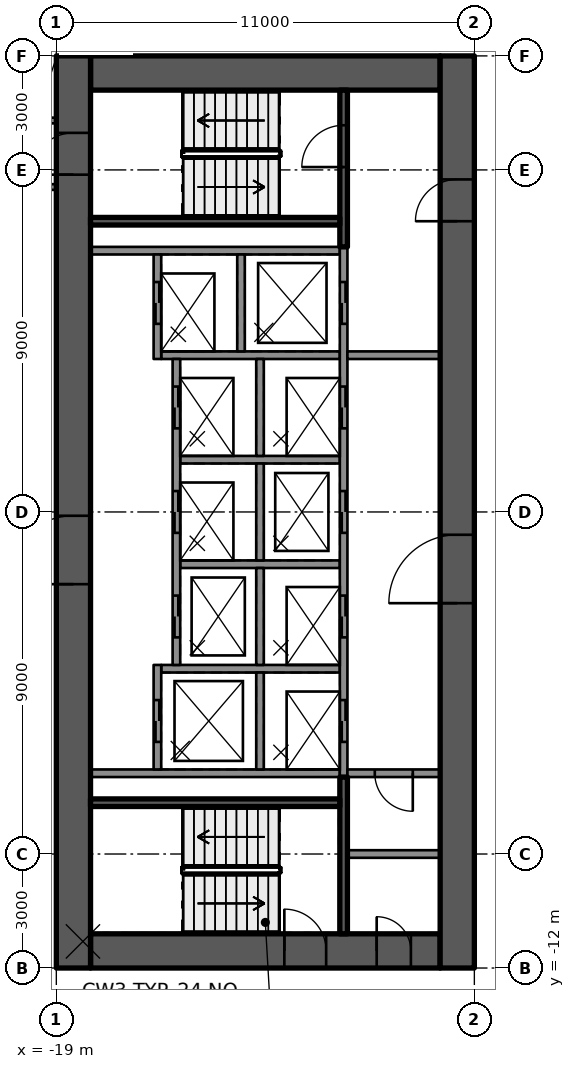
"""IFC4 building model, lengths in metres.
Left out: names, types, materials, properties, quantities, classifications, styles, units other than length and angle.
Written with IfcOpenShell. Run it as: python <this file> out.ifc"""

import sys

from ifc_helpers import new_model, si_unit, direction, frame, frame_2d, origin, place, context, subcontext, project, spatial, rectangle, extrude, element, fill, save


model = new_model("IFC4")
c1 = context("Model", 3, precision=1e-05, world=origin(), true_north=direction((0.0, 1.0)))
c2 = subcontext(c1, "Body", "Model", "MODEL_VIEW")
j1 = project(units=[si_unit("LENGTHUNIT", "METRE"), si_unit("PLANEANGLEUNIT", "RADIAN")], contexts=[c1])
p1 = place(None, origin())
s1 = spatial("IfcSite", under=j1, at=p1, CompositionType="ELEMENT")
p2 = place(p1, origin())
s2 = spatial("IfcBuilding", under=s1, at=p2, CompositionType="ELEMENT")
p3 = place(p2, origin())
s3 = spatial("IfcBuildingStorey", under=s2, at=p3, CompositionType="ELEMENT", Elevation=0.0)
p4 = place(p3, frame((-18.1, 11.55, -0.5), z_axis=(0.0, 0.0, 1.0), x_axis=(1.0, 0.0, 0.0)))
e1 = element("IfcWall", 1, at=p4, inside=s3, PredefinedType="SHEAR", context=c2, shape_type="SweptSolid", body=[
    extrude(rectangle(XDim=9.2, YDim=0.9, at=frame_2d((4.6, 0.0))), origin(), (0.0, 0.0, 1.0), 11.0),
])
p5 = place(p3, frame((-18.1, -11.55, -0.5), z_axis=(0.0, 0.0, 1.0), x_axis=(1.0, 0.0, 0.0)))
e2 = element("IfcWall", 2, at=p5, inside=s3, PredefinedType="SHEAR", context=c2, shape_type="SweptSolid", body=[
    extrude(rectangle(XDim=9.2, YDim=0.9, at=frame_2d((4.6, 0.0))), origin(), (0.0, 0.0, 1.0), 11.0),
])
p6 = place(p5, frame((5.1, 0.0, 0.5)))
e3 = element("IfcOpeningElement", 3, at=p6, cuts=e2, PredefinedType="OPENING", context=c2, shape_type="SweptSolid", body=[
    extrude(rectangle(XDim=1.1, YDim=2.1, at=frame_2d((0.55, 1.05))), frame((0.0, 0.46, 0.0), z_axis=(0.0, -1.0, 0.0), x_axis=(1.0, 0.0, 0.0)), (0.0, 0.0, 1.0), 0.92),
])
p7 = place(p5, frame((7.53, 0.0, 0.5)))
e4 = element("IfcOpeningElement", 4, at=p7, cuts=e2, PredefinedType="OPENING", context=c2, shape_type="SweptSolid", body=[
    extrude(rectangle(XDim=0.9, YDim=2.1, at=frame_2d((0.45, 1.05))), frame((0.0, 0.46, 0.0), z_axis=(0.0, -1.0, 0.0), x_axis=(1.0, 0.0, 0.0)), (0.0, 0.0, 1.0), 0.92),
])
p8 = place(p3, frame((-18.55, -12.0, -0.5), z_axis=(0.0, 0.0, 1.0), x_axis=(0.0, 1.0, 0.0)))
e5 = element("IfcWall", 5, at=p8, inside=s3, PredefinedType="SHEAR", context=c2, shape_type="SweptSolid", body=[
    extrude(rectangle(XDim=24.0, YDim=0.9, at=frame_2d((12.0, 0.0))), origin(), (0.0, 0.0, 1.0), 11.0),
])
p9 = place(p8, frame((10.1, 0.0, 0.5)))
e6 = element("IfcOpeningElement", 6, at=p9, cuts=e5, PredefinedType="OPENING", context=c2, shape_type="SweptSolid", body=[
    extrude(rectangle(XDim=1.8, YDim=2.1, at=frame_2d((0.9, 1.05))), frame((0.0, 0.46, 0.0), z_axis=(0.0, -1.0, 0.0), x_axis=(1.0, 0.0, 0.0)), (0.0, 0.0, 1.0), 0.92),
])
p10 = place(p8, frame((20.875, 0.0, 0.5)))
e7 = element("IfcOpeningElement", 7, at=p10, cuts=e5, PredefinedType="OPENING", context=c2, shape_type="SweptSolid", body=[
    extrude(rectangle(XDim=1.1, YDim=2.1, at=frame_2d((0.55, 1.05))), frame((0.0, 0.46, 0.0), z_axis=(0.0, -1.0, 0.0), x_axis=(1.0, 0.0, 0.0)), (0.0, 0.0, 1.0), 0.92),
])
p11 = place(p3, frame((-8.45, -12.0, -0.5), z_axis=(0.0, 0.0, 1.0), x_axis=(0.0, 1.0, 0.0)))
e8 = element("IfcWall", 8, at=p11, inside=s3, PredefinedType="SHEAR", context=c2, shape_type="SweptSolid", body=[
    extrude(rectangle(XDim=24.0, YDim=0.9, at=frame_2d((12.0, 0.0))), origin(), (0.0, 0.0, 1.0), 11.0),
])
p12 = place(p11, frame((9.6, 0.0, 0.5)))
e9 = element("IfcOpeningElement", 9, at=p12, cuts=e8, PredefinedType="OPENING", context=c2, shape_type="SweptSolid", body=[
    extrude(rectangle(XDim=1.8, YDim=2.1, at=frame_2d((0.9, 1.05))), frame((0.0, 0.46, 0.0), z_axis=(0.0, -1.0, 0.0), x_axis=(1.0, 0.0, 0.0)), (0.0, 0.0, 1.0), 0.92),
])
p13 = place(p11, frame((19.65, 0.0, 0.5)))
e10 = element("IfcOpeningElement", 10, at=p13, cuts=e8, PredefinedType="OPENING", context=c2, shape_type="SweptSolid", body=[
    extrude(rectangle(XDim=1.1, YDim=2.1, at=frame_2d((0.55, 1.05))), frame((0.0, 0.46, 0.0), z_axis=(0.0, -1.0, 0.0), x_axis=(1.0, 0.0, 0.0)), (0.0, 0.0, 1.0), 0.92),
])
for number, where, z_axis, x_axis in (
    (11, (-11.54, 6.875, 0.0), (0.0, 0.0, 1.0), (-1.0, 0.0, 0.0)),
    (12, (-11.54, -6.875, 0.0), (0.0, 0.0, 1.0), (-1.0, 0.0, 0.0)),
):
    element("IfcWall", number, at=place(p3, frame(where, z_axis=z_axis, x_axis=x_axis)), inside=s3, PredefinedType="SOLIDWALL", context=c2, shape_type="SweptSolid", body=[
        extrude(rectangle(XDim=6.56, YDim=0.2, at=frame_2d((3.28, 0.0))), origin(), (0.0, 0.0, 1.0), 10.09),
    ])
p14 = place(p3, frame((-11.54, -4.125, 0.0), z_axis=(0.0, 0.0, 1.0), x_axis=(-1.0, 0.0, 0.0)))
e13 = element("IfcWall", 13, at=p14, inside=s3, PredefinedType="SOLIDWALL", context=c2, shape_type="SweptSolid", body=[
    extrude(rectangle(XDim=4.7, YDim=0.2, at=frame_2d((2.35, 0.0))), origin(), (0.0, 0.0, 1.0), 10.09),
])
for number, where, z_axis, x_axis in (
    (14, (-11.54, -1.375, 0.0), (0.0, 0.0, 1.0), (-1.0, 0.0, 0.0)),
    (15, (-11.54, 1.375, 0.0), (0.0, 0.0, 1.0), (-1.0, 0.0, 0.0)),
):
    element("IfcWall", number, at=place(p3, frame(where, z_axis=z_axis, x_axis=x_axis)), inside=s3, PredefinedType="SOLIDWALL", context=c2, shape_type="SweptSolid", body=[
        extrude(rectangle(XDim=4.2, YDim=0.2, at=frame_2d((2.1, 0.0))), origin(), (0.0, 0.0, 1.0), 10.09),
    ])
p15 = place(p3, frame((-11.54, 4.125, 0.0), z_axis=(0.0, 0.0, 1.0), x_axis=(-1.0, 0.0, 0.0)))
e16 = element("IfcWall", 16, at=p15, inside=s3, PredefinedType="SOLIDWALL", context=c2, shape_type="SweptSolid", body=[
    extrude(rectangle(XDim=4.7, YDim=0.2, at=frame_2d((2.35, 0.0))), origin(), (0.0, 0.0, 1.0), 10.09),
])
p16 = place(p3, frame((-11.44, -6.975, 0.0), z_axis=(0.0, 0.0, 1.0), x_axis=(0.0, 1.0, 0.0)))
e17 = element("IfcWall", 17, at=p16, inside=s3, PredefinedType="SOLIDWALL", context=c2, shape_type="SweptSolid", body=[
    extrude(rectangle(XDim=13.95, YDim=0.2, at=frame_2d((6.975, 0.0))), origin(), (0.0, 0.0, 1.0), 10.09),
])
p17 = place(p16, frame((0.925, 0.0, 0.0)))
e18 = element("IfcOpeningElement", 18, at=p17, cuts=e17, PredefinedType="OPENING", context=c2, shape_type="SweptSolid", body=[
    extrude(rectangle(XDim=1.1, YDim=2.1, at=frame_2d((0.55, 1.05))), frame((0.0, 0.11, 0.0), z_axis=(0.0, -1.0, 0.0), x_axis=(1.0, 0.0, 0.0)), (0.0, 0.0, 1.0), 0.22),
])
p18 = place(p16, frame((3.675, 0.0, 0.0)))
e19 = element("IfcOpeningElement", 19, at=p18, cuts=e17, PredefinedType="OPENING", context=c2, shape_type="SweptSolid", body=[
    extrude(rectangle(XDim=1.1, YDim=2.1, at=frame_2d((0.55, 1.05))), frame((0.0, 0.11, 0.0), z_axis=(0.0, -1.0, 0.0), x_axis=(1.0, 0.0, 0.0)), (0.0, 0.0, 1.0), 0.22),
])
p19 = place(p16, frame((6.425, 0.0, 0.0)))
e20 = element("IfcOpeningElement", 20, at=p19, cuts=e17, PredefinedType="OPENING", context=c2, shape_type="SweptSolid", body=[
    extrude(rectangle(XDim=1.1, YDim=2.1, at=frame_2d((0.55, 1.05))), frame((0.0, 0.11, 0.0), z_axis=(0.0, -1.0, 0.0), x_axis=(1.0, 0.0, 0.0)), (0.0, 0.0, 1.0), 0.22),
])
p20 = place(p16, frame((9.175, 0.0, 0.0)))
e21 = element("IfcOpeningElement", 21, at=p20, cuts=e17, PredefinedType="OPENING", context=c2, shape_type="SweptSolid", body=[
    extrude(rectangle(XDim=1.1, YDim=2.1, at=frame_2d((0.55, 1.05))), frame((0.0, 0.11, 0.0), z_axis=(0.0, -1.0, 0.0), x_axis=(1.0, 0.0, 0.0)), (0.0, 0.0, 1.0), 0.22),
])
p21 = place(p16, frame((11.925, 0.0, 0.0)))
e22 = element("IfcOpeningElement", 22, at=p21, cuts=e17, PredefinedType="OPENING", context=c2, shape_type="SweptSolid", body=[
    extrude(rectangle(XDim=1.1, YDim=2.1, at=frame_2d((0.55, 1.05))), frame((0.0, 0.11, 0.0), z_axis=(0.0, -1.0, 0.0), x_axis=(1.0, 0.0, 0.0)), (0.0, 0.0, 1.0), 0.22),
])
for number, where, z_axis, x_axis in (
    (23, (-13.64, -6.775, 0.0), (0.0, 0.0, 1.0), (0.0, 1.0, 0.0)),
    (24, (-13.64, -4.025, 0.0), (0.0, 0.0, 1.0), (0.0, 1.0, 0.0)),
    (25, (-13.64, -1.275, 0.0), (0.0, 0.0, 1.0), (0.0, 1.0, 0.0)),
    (26, (-13.64, 1.475, 0.0), (0.0, 0.0, 1.0), (0.0, 1.0, 0.0)),
    (27, (-14.14, 4.225, 0.0), (0.0, 0.0, 1.0), (0.0, 1.0, 0.0)),
):
    element("IfcWall", number, at=place(p3, frame(where, z_axis=z_axis, x_axis=x_axis)), inside=s3, PredefinedType="SOLIDWALL", context=c2, shape_type="SweptSolid", body=[
        extrude(rectangle(XDim=2.55, YDim=0.2, at=frame_2d((1.275, 0.0))), origin(), (0.0, 0.0, 1.0), 10.09),
    ])
p22 = place(p3, frame((-16.34, -6.775, 0.0), z_axis=(0.0, 0.0, 1.0), x_axis=(0.0, 1.0, 0.0)))
e28 = element("IfcWall", 28, at=p22, inside=s3, PredefinedType="SOLIDWALL", context=c2, shape_type="SweptSolid", body=[
    extrude(rectangle(XDim=2.75, YDim=0.2, at=frame_2d((1.375, 0.0))), origin(), (0.0, 0.0, 1.0), 10.09),
])
p23 = place(p22, frame((0.725, 0.0, 0.0)))
e29 = element("IfcOpeningElement", 29, at=p23, cuts=e28, PredefinedType="OPENING", context=c2, shape_type="SweptSolid", body=[
    extrude(rectangle(XDim=1.1, YDim=2.1, at=frame_2d((0.55, 1.05))), frame((0.0, 0.11, 0.0), z_axis=(0.0, -1.0, 0.0), x_axis=(1.0, 0.0, 0.0)), (0.0, 0.0, 1.0), 0.22),
])
p24 = place(p3, frame((-15.84, -4.025, 0.0), z_axis=(0.0, 0.0, 1.0), x_axis=(0.0, 1.0, 0.0)))
e30 = element("IfcWall", 30, at=p24, inside=s3, PredefinedType="SOLIDWALL", context=c2, shape_type="SweptSolid", body=[
    extrude(rectangle(XDim=8.05, YDim=0.2, at=frame_2d((4.025, 0.0))), origin(), (0.0, 0.0, 1.0), 10.09),
])
p25 = place(p24, frame((0.725, 0.0, 0.0)))
e31 = element("IfcOpeningElement", 31, at=p25, cuts=e30, PredefinedType="OPENING", context=c2, shape_type="SweptSolid", body=[
    extrude(rectangle(XDim=1.1, YDim=2.1, at=frame_2d((0.55, 1.05))), frame((0.0, 0.11, 0.0), z_axis=(0.0, -1.0, 0.0), x_axis=(1.0, 0.0, 0.0)), (0.0, 0.0, 1.0), 0.22),
])
p26 = place(p24, frame((3.475, 0.0, 0.0)))
e32 = element("IfcOpeningElement", 32, at=p26, cuts=e30, PredefinedType="OPENING", context=c2, shape_type="SweptSolid", body=[
    extrude(rectangle(XDim=1.1, YDim=2.1, at=frame_2d((0.55, 1.05))), frame((0.0, 0.11, 0.0), z_axis=(0.0, -1.0, 0.0), x_axis=(1.0, 0.0, 0.0)), (0.0, 0.0, 1.0), 0.22),
])
p27 = place(p24, frame((6.225, 0.0, 0.0)))
e33 = element("IfcOpeningElement", 33, at=p27, cuts=e30, PredefinedType="OPENING", context=c2, shape_type="SweptSolid", body=[
    extrude(rectangle(XDim=1.1, YDim=2.1, at=frame_2d((0.55, 1.05))), frame((0.0, 0.11, 0.0), z_axis=(0.0, -1.0, 0.0), x_axis=(1.0, 0.0, 0.0)), (0.0, 0.0, 1.0), 0.22),
])
p28 = place(p3, frame((-16.34, 4.025, 0.0), z_axis=(0.0, 0.0, 1.0), x_axis=(0.0, 1.0, 0.0)))
e34 = element("IfcWall", 34, at=p28, inside=s3, PredefinedType="SOLIDWALL", context=c2, shape_type="SweptSolid", body=[
    extrude(rectangle(XDim=2.75, YDim=0.2, at=frame_2d((1.375, 0.0))), origin(), (0.0, 0.0, 1.0), 10.09),
])
p29 = place(p28, frame((0.925, 0.0, 0.0)))
e35 = element("IfcOpeningElement", 35, at=p29, cuts=e34, PredefinedType="OPENING", context=c2, shape_type="SweptSolid", body=[
    extrude(rectangle(XDim=1.1, YDim=2.1, at=frame_2d((0.55, 1.05))), frame((0.0, 0.11, 0.0), z_axis=(0.0, -1.0, 0.0), x_axis=(1.0, 0.0, 0.0)), (0.0, 0.0, 1.0), 0.22),
])
p30 = place(p3, frame((-11.44, 6.975, 0.0), z_axis=(0.0, 0.0, 1.0), x_axis=(0.0, 1.0, 0.0)))
e36 = element("IfcWall", 36, at=p30, inside=s3, PredefinedType="SOLIDWALL", context=c2, shape_type="SweptSolid", body=[
    extrude(rectangle(XDim=4.125, YDim=0.2, at=frame_2d((2.062, 0.0))), origin(), (0.0, 0.0, 1.0), 10.09),
])
p31 = place(p30, frame((2.1, 0.0, 0.0)))
e37 = element("IfcOpeningElement", 37, at=p31, cuts=e36, PredefinedType="OPENING", context=c2, shape_type="SweptSolid", body=[
    extrude(rectangle(XDim=1.1, YDim=2.1, at=frame_2d((0.55, 1.05))), frame((0.0, 0.11, 0.0), z_axis=(0.0, -1.0, 0.0), x_axis=(1.0, 0.0, 0.0)), (0.0, 0.0, 1.0), 0.22),
])
p32 = place(p3, frame((-11.54, 7.65, 0.0), z_axis=(0.0, 0.0, 1.0), x_axis=(-1.0, 0.0, 0.0)))
e38 = element("IfcWall", 38, at=p32, inside=s3, PredefinedType="SOLIDWALL", context=c2, shape_type="SweptSolid", body=[
    extrude(rectangle(XDim=6.56, YDim=0.2, at=frame_2d((3.28, 0.0))), origin(), (0.0, 0.0, 1.0), 10.09),
])
p33 = place(p3, frame((-11.44, -11.1, 0.0), z_axis=(0.0, 0.0, 1.0), x_axis=(0.0, 1.0, 0.0)))
e39 = element("IfcWall", 39, at=p33, inside=s3, PredefinedType="SOLIDWALL", context=c2, shape_type="SweptSolid", body=[
    extrude(rectangle(XDim=4.125, YDim=0.2, at=frame_2d((2.062, 0.0))), origin(), (0.0, 0.0, 1.0), 10.09),
])
p34 = place(p3, frame((-11.54, -7.65, 0.0), z_axis=(0.0, 0.0, 1.0), x_axis=(-1.0, 0.0, 0.0)))
e40 = element("IfcWall", 40, at=p34, inside=s3, PredefinedType="SOLIDWALL", context=c2, shape_type="SweptSolid", body=[
    extrude(rectangle(XDim=6.56, YDim=0.2, at=frame_2d((3.28, 0.0))), origin(), (0.0, 0.0, 1.0), 10.09),
])
p35 = place(p3, frame((-8.9, 4.125, 0.0), z_axis=(0.0, 0.0, 1.0), x_axis=(-1.0, 0.0, 0.0)))
e41 = element("IfcWall", 41, at=p35, inside=s3, PredefinedType="PARTITIONING", context=c2, shape_type="SweptSolid", body=[
    extrude(rectangle(XDim=2.44, YDim=0.2, at=frame_2d((1.22, 0.0))), origin(), (0.0, 0.0, 1.0), 10.09),
])
p36 = place(p3, frame((-8.9, -6.875, 0.0), z_axis=(0.0, 0.0, 1.0), x_axis=(-1.0, 0.0, 0.0)))
e42 = element("IfcWall", 42, at=p36, inside=s3, PredefinedType="PARTITIONING", context=c2, shape_type="SweptSolid", body=[
    extrude(rectangle(XDim=2.44, YDim=0.2, at=frame_2d((1.22, 0.0))), origin(), (0.0, 0.0, 1.0), 10.09),
])
p37 = place(p36, frame((0.72, 0.0, 0.0)))
e43 = element("IfcOpeningElement", 43, at=p37, cuts=e42, PredefinedType="OPENING", context=c2, shape_type="SweptSolid", body=[
    extrude(rectangle(XDim=1.0, YDim=2.1, at=frame_2d((0.5, 1.05))), frame((0.0, 0.11, 0.0), z_axis=(0.0, -1.0, 0.0), x_axis=(1.0, 0.0, 0.0)), (0.0, 0.0, 1.0), 0.22),
])
p38 = place(p3, frame((-8.9, -9.0, 0.0), z_axis=(0.0, 0.0, 1.0), x_axis=(-1.0, 0.0, 0.0)))
e44 = element("IfcWall", 44, at=p38, inside=s3, PredefinedType="PARTITIONING", context=c2, shape_type="SweptSolid", body=[
    extrude(rectangle(XDim=2.44, YDim=0.2, at=frame_2d((1.22, 0.0))), origin(), (0.0, 0.0, 1.0), 10.09),
])
p39 = place(p3, frame((-23.05, 10.3, 0.0), z_axis=(0.0, 0.0, 1.0), x_axis=(1.0, 0.0, 0.0)))
e45 = element("IfcWall", 45, at=p39, inside=s3, PredefinedType="SOLIDWALL", context=c2, shape_type="SweptSolid", body=[
    extrude(rectangle(XDim=4.05, YDim=0.15, at=frame_2d((2.025, 0.0))), origin(), (0.0, 0.0, 1.0), 10.09),
])
p40 = place(p3, frame((-21.3, 8.55, 0.0), z_axis=(0.0, 0.0, 1.0), x_axis=(1.0, 0.0, 0.0)))
e46 = element("IfcWall", 46, at=p40, inside=s3, PredefinedType="SOLIDWALL", context=c2, shape_type="SweptSolid", body=[
    extrude(rectangle(XDim=2.3, YDim=0.15, at=frame_2d((1.15, 0.0))), origin(), (0.0, 0.0, 1.0), 10.09),
])
p41 = place(p17, origin())
e47 = element("IfcDoor", 47, at=p41, inside=s3, OperationType="DOUBLE_DOOR_SLIDING", PredefinedType="DOOR", context=c2, shape_type="SweptSolid", body=[
    extrude(rectangle(XDim=1.1, YDim=2.1, at=frame_2d((0.55, 1.05))), frame((0.0, 0.025, 0.0), z_axis=(0.0, -1.0, 0.0), x_axis=(1.0, 0.0, 0.0)), (0.0, 0.0, 1.0), 0.05),
])
fill(e18, e47)
p42 = place(p23, origin())
e48 = element("IfcDoor", 48, at=p42, inside=s3, OperationType="DOUBLE_DOOR_SLIDING", PredefinedType="DOOR", context=c2, shape_type="SweptSolid", body=[
    extrude(rectangle(XDim=1.1, YDim=2.1, at=frame_2d((0.55, 1.05))), frame((0.0, 0.025, 0.0), z_axis=(0.0, -1.0, 0.0), x_axis=(1.0, 0.0, 0.0)), (0.0, 0.0, 1.0), 0.05),
])
fill(e29, e48)
p43 = place(p18, origin())
e49 = element("IfcDoor", 49, at=p43, inside=s3, OperationType="DOUBLE_DOOR_SLIDING", PredefinedType="DOOR", context=c2, shape_type="SweptSolid", body=[
    extrude(rectangle(XDim=1.1, YDim=2.1, at=frame_2d((0.55, 1.05))), frame((0.0, 0.025, 0.0), z_axis=(0.0, -1.0, 0.0), x_axis=(1.0, 0.0, 0.0)), (0.0, 0.0, 1.0), 0.05),
])
fill(e19, e49)
p44 = place(p25, origin())
e50 = element("IfcDoor", 50, at=p44, inside=s3, OperationType="DOUBLE_DOOR_SLIDING", PredefinedType="DOOR", context=c2, shape_type="SweptSolid", body=[
    extrude(rectangle(XDim=1.1, YDim=2.1, at=frame_2d((0.55, 1.05))), frame((0.0, 0.025, 0.0), z_axis=(0.0, -1.0, 0.0), x_axis=(1.0, 0.0, 0.0)), (0.0, 0.0, 1.0), 0.05),
])
fill(e31, e50)
p45 = place(p19, origin())
e51 = element("IfcDoor", 51, at=p45, inside=s3, OperationType="DOUBLE_DOOR_SLIDING", PredefinedType="DOOR", context=c2, shape_type="SweptSolid", body=[
    extrude(rectangle(XDim=1.1, YDim=2.1, at=frame_2d((0.55, 1.05))), frame((0.0, 0.025, 0.0), z_axis=(0.0, -1.0, 0.0), x_axis=(1.0, 0.0, 0.0)), (0.0, 0.0, 1.0), 0.05),
])
fill(e20, e51)
p46 = place(p26, origin())
e52 = element("IfcDoor", 52, at=p46, inside=s3, OperationType="DOUBLE_DOOR_SLIDING", PredefinedType="DOOR", context=c2, shape_type="SweptSolid", body=[
    extrude(rectangle(XDim=1.1, YDim=2.1, at=frame_2d((0.55, 1.05))), frame((0.0, 0.025, 0.0), z_axis=(0.0, -1.0, 0.0), x_axis=(1.0, 0.0, 0.0)), (0.0, 0.0, 1.0), 0.05),
])
fill(e32, e52)
p47 = place(p20, origin())
e53 = element("IfcDoor", 53, at=p47, inside=s3, OperationType="DOUBLE_DOOR_SLIDING", PredefinedType="DOOR", context=c2, shape_type="SweptSolid", body=[
    extrude(rectangle(XDim=1.1, YDim=2.1, at=frame_2d((0.55, 1.05))), frame((0.0, 0.025, 0.0), z_axis=(0.0, -1.0, 0.0), x_axis=(1.0, 0.0, 0.0)), (0.0, 0.0, 1.0), 0.05),
])
fill(e21, e53)
p48 = place(p27, origin())
e54 = element("IfcDoor", 54, at=p48, inside=s3, OperationType="DOUBLE_DOOR_SLIDING", PredefinedType="DOOR", context=c2, shape_type="SweptSolid", body=[
    extrude(rectangle(XDim=1.1, YDim=2.1, at=frame_2d((0.55, 1.05))), frame((0.0, 0.025, 0.0), z_axis=(0.0, -1.0, 0.0), x_axis=(1.0, 0.0, 0.0)), (0.0, 0.0, 1.0), 0.05),
])
fill(e33, e54)
p49 = place(p21, origin())
e55 = element("IfcDoor", 55, at=p49, inside=s3, OperationType="DOUBLE_DOOR_SLIDING", PredefinedType="DOOR", context=c2, shape_type="SweptSolid", body=[
    extrude(rectangle(XDim=1.1, YDim=2.1, at=frame_2d((0.55, 1.05))), frame((0.0, 0.025, 0.0), z_axis=(0.0, -1.0, 0.0), x_axis=(1.0, 0.0, 0.0)), (0.0, 0.0, 1.0), 0.05),
])
fill(e22, e55)
p50 = place(p29, origin())
e56 = element("IfcDoor", 56, at=p50, inside=s3, OperationType="DOUBLE_DOOR_SLIDING", PredefinedType="DOOR", context=c2, shape_type="SweptSolid", body=[
    extrude(rectangle(XDim=1.1, YDim=2.1, at=frame_2d((0.55, 1.05))), frame((0.0, 0.025, 0.0), z_axis=(0.0, -1.0, 0.0), x_axis=(1.0, 0.0, 0.0)), (0.0, 0.0, 1.0), 0.05),
])
fill(e35, e56)
p51 = place(p12, origin())
e57 = element("IfcDoor", 57, at=p51, inside=s3, OperationType="SINGLE_SWING_LEFT", PredefinedType="DOOR", context=c2, shape_type="SweptSolid", body=[
    extrude(rectangle(XDim=1.8, YDim=2.1, at=frame_2d((0.9, 1.05))), frame((0.0, 0.025, 0.0), z_axis=(0.0, -1.0, 0.0), x_axis=(1.0, 0.0, 0.0)), (0.0, 0.0, 1.0), 0.05),
])
fill(e9, e57)
p52 = place(p9, origin())
e58 = element("IfcDoor", 58, at=p52, inside=s3, OperationType="SINGLE_SWING_LEFT", PredefinedType="DOOR", context=c2, shape_type="SweptSolid", body=[
    extrude(rectangle(XDim=1.8, YDim=2.1, at=frame_2d((0.9, 1.05))), frame((0.0, 0.025, 0.0), z_axis=(0.0, -1.0, 0.0), x_axis=(1.0, 0.0, 0.0)), (0.0, 0.0, 1.0), 0.05),
])
fill(e6, e58)
p53 = place(p13, origin())
e59 = element("IfcDoor", 59, at=p53, inside=s3, OperationType="SINGLE_SWING_RIGHT", PredefinedType="DOOR", context=c2, shape_type="SweptSolid", body=[
    extrude(rectangle(XDim=1.1, YDim=2.1, at=frame_2d((0.55, 1.05))), frame((0.0, 0.025, 0.0), z_axis=(0.0, -1.0, 0.0), x_axis=(1.0, 0.0, 0.0)), (0.0, 0.0, 1.0), 0.05),
])
fill(e10, e59)
p54 = place(p6, origin())
e60 = element("IfcDoor", 60, at=p54, inside=s3, OperationType="SINGLE_SWING_RIGHT", PredefinedType="DOOR", context=c2, shape_type="SweptSolid", body=[
    extrude(rectangle(XDim=1.1, YDim=2.1, at=frame_2d((0.55, 1.05))), frame((0.0, 0.025, 0.0), z_axis=(0.0, -1.0, 0.0), x_axis=(1.0, 0.0, 0.0)), (0.0, 0.0, 1.0), 0.05),
])
fill(e3, e60)
p55 = place(p31, origin())
e61 = element("IfcDoor", 61, at=p55, inside=s3, OperationType="SINGLE_SWING_RIGHT", PredefinedType="DOOR", context=c2, shape_type="SweptSolid", body=[
    extrude(rectangle(XDim=1.1, YDim=2.1, at=frame_2d((0.55, 1.05))), frame((0.0, 0.025, 0.0), z_axis=(0.0, -1.0, 0.0), x_axis=(1.0, 0.0, 0.0)), (0.0, 0.0, 1.0), 0.05),
])
fill(e37, e61)
p56 = place(p7, origin())
e62 = element("IfcDoor", 62, at=p56, inside=s3, OperationType="SINGLE_SWING_RIGHT", PredefinedType="DOOR", context=c2, shape_type="SweptSolid", body=[
    extrude(rectangle(XDim=0.9, YDim=2.1, at=frame_2d((0.45, 1.05))), frame((0.0, 0.025, 0.0), z_axis=(0.0, -1.0, 0.0), x_axis=(1.0, 0.0, 0.0)), (0.0, 0.0, 1.0), 0.05),
])
fill(e4, e62)
p57 = place(p37, origin())
e63 = element("IfcDoor", 63, at=p57, inside=s3, OperationType="SINGLE_SWING_RIGHT", PredefinedType="DOOR", context=c2, shape_type="SweptSolid", body=[
    extrude(rectangle(XDim=1.0, YDim=2.1, at=frame_2d((0.5, 1.05))), frame((0.0, 0.025, 0.0), z_axis=(0.0, -1.0, 0.0), x_axis=(1.0, 0.0, 0.0)), (0.0, 0.0, 1.0), 0.05),
])
fill(e43, e63)
p58 = place(p10, origin())
e64 = element("IfcDoor", 64, at=p58, inside=s3, OperationType="SINGLE_SWING_RIGHT", PredefinedType="DOOR", context=c2, shape_type="SweptSolid", body=[
    extrude(rectangle(XDim=1.1, YDim=2.1, at=frame_2d((0.55, 1.05))), frame((0.0, 0.025, 0.0), z_axis=(0.0, -1.0, 0.0), x_axis=(1.0, 0.0, 0.0)), (0.0, 0.0, 1.0), 0.05),
])
fill(e7, e64)
save(model, sys.argv[1])
